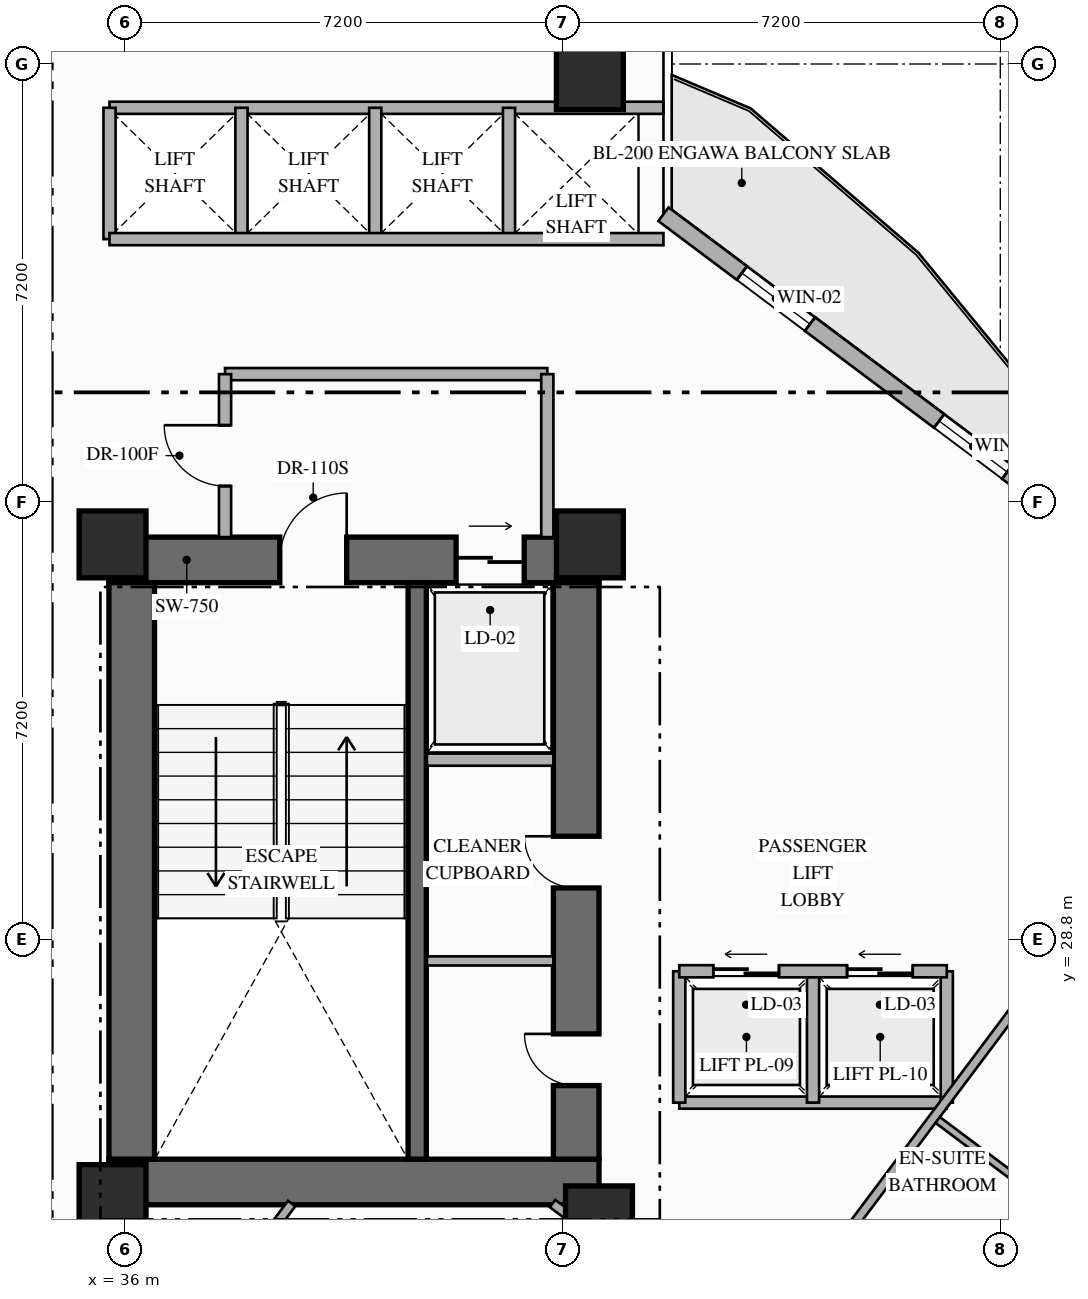
"""IFC4 building model, lengths in metres.
Left out: names, types, materials, properties, quantities, classifications, styles, units other than length and angle.
Written with IfcOpenShell. Run it as: python <this file> out.ifc"""

import sys

from ifc_helpers import new_model, si_unit, direction, frame, frame_2d, origin, origin_2d, place, context, subcontext, project, spatial, rectangle, extrude, element, fill, save


model = new_model("IFC4")
c1 = context("Model", 3, precision=1e-05, world=origin(), true_north=direction((0.0, 1.0)))
c2 = subcontext(c1, "Body", "Model", "MODEL_VIEW")
j1 = project(units=[si_unit("LENGTHUNIT", "METRE"), si_unit("PLANEANGLEUNIT", "RADIAN")], contexts=[c1])
p1 = place(None, origin())
s1 = spatial("IfcSite", under=j1, at=p1, CompositionType="ELEMENT")
p2 = place(p1, origin())
s2 = spatial("IfcBuilding", under=s1, at=p2, CompositionType="ELEMENT")
p3 = place(p2, frame((0.0, 0.0, 56.7)))
s3 = spatial("IfcBuildingStorey", under=s2, at=p3, CompositionType="ELEMENT", Elevation=56.7)
p4 = place(p3, frame((35.74, 24.815, 0.0), z_axis=(0.0, 0.0, 1.0), x_axis=(1.0, 0.0, 0.0)))
e1 = element("IfcWall", 1, at=p4, inside=s3, PredefinedType="SHEAR", context=c2, shape_type="SweptSolid", body=[
    extrude(rectangle(XDim=8.06, YDim=0.75, at=frame_2d((4.03, 0.0))), origin(), (0.0, 0.0, 1.0), 3.35),
])
p5 = place(p3, frame((35.74, 35.045, 0.0), z_axis=(0.0, 0.0, 1.0), x_axis=(1.0, 0.0, 0.0)))
e2 = element("IfcWall", 2, at=p5, inside=s3, PredefinedType="SHEAR", context=c2, shape_type="SweptSolid", body=[
    extrude(rectangle(XDim=8.06, YDim=0.75, at=frame_2d((4.03, 0.0))), origin(), (0.0, 0.0, 1.0), 3.35),
])
p6 = place(p5, frame((2.81, 0.0, 0.0)))
e3 = element("IfcOpeningElement", 3, at=p6, cuts=e2, PredefinedType="OPENING", context=c2, shape_type="SweptSolid", body=[
    extrude(rectangle(XDim=1.1, YDim=2.2, at=frame_2d((0.55, 1.1))), frame((0.0, 0.385, 0.0), z_axis=(0.0, -1.0, 0.0), x_axis=(1.0, 0.0, 0.0)), (0.0, 0.0, 1.0), 0.77),
])
p7 = place(p5, frame((5.71, 0.0, 0.0)))
e4 = element("IfcOpeningElement", 4, at=p7, cuts=e2, PredefinedType="OPENING", context=c2, shape_type="SweptSolid", body=[
    extrude(rectangle(XDim=1.12, YDim=2.15, at=frame_2d((0.56, 1.075))), frame((0.0, 0.385, 0.0), z_axis=(0.0, -1.0, 0.0), x_axis=(1.0, 0.0, 0.0)), (0.0, 0.0, 1.0), 0.77),
])
p8 = place(p3, frame((36.115, 25.19, 0.0), z_axis=(0.0, 0.0, 1.0), x_axis=(0.0, 1.0, 0.0)))
e5 = element("IfcWall", 5, at=p8, inside=s3, PredefinedType="SHEAR", context=c2, shape_type="SweptSolid", body=[
    extrude(rectangle(XDim=9.48, YDim=0.75, at=frame_2d((4.74, 0.0))), origin(), (0.0, 0.0, 1.0), 3.35),
])
p9 = place(p3, frame((43.425, 25.19, 0.0), z_axis=(0.0, 0.0, 1.0), x_axis=(0.0, 1.0, 0.0)))
e6 = element("IfcWall", 6, at=p9, inside=s3, PredefinedType="SHEAR", context=c2, shape_type="SweptSolid", body=[
    extrude(rectangle(XDim=9.48, YDim=0.75, at=frame_2d((4.74, 0.0))), origin(), (0.0, 0.0, 1.0), 3.35),
])
p10 = place(p9, frame((1.21, 0.0, 0.0)))
e7 = element("IfcOpeningElement", 7, at=p10, cuts=e6, PredefinedType="OPENING", context=c2, shape_type="SweptSolid", body=[
    extrude(rectangle(XDim=0.85, YDim=2.08, at=frame_2d((0.425, 1.04))), frame((0.0, 0.385, 0.0), z_axis=(0.0, -1.0, 0.0), x_axis=(1.0, 0.0, 0.0)), (0.0, 0.0, 1.0), 0.77),
])
p11 = place(p9, frame((4.46, 0.0, 0.0)))
e8 = element("IfcOpeningElement", 8, at=p11, cuts=e6, PredefinedType="OPENING", context=c2, shape_type="SweptSolid", body=[
    extrude(rectangle(XDim=0.85, YDim=2.08, at=frame_2d((0.425, 1.04))), frame((0.0, 0.385, 0.0), z_axis=(0.0, -1.0, 0.0), x_axis=(1.0, 0.0, 0.0)), (0.0, 0.0, 1.0), 0.77),
])
p12 = place(p3, frame((40.81, 25.19, 0.0), z_axis=(0.0, 0.0, 1.0), x_axis=(0.0, 1.0, 0.0)))
e9 = element("IfcWall", 9, at=p12, inside=s3, PredefinedType="SHEAR", context=c2, shape_type="SweptSolid", body=[
    extrude(rectangle(XDim=9.48, YDim=0.3, at=frame_2d((4.74, 0.0))), origin(), (0.0, 0.0, 1.0), 3.35),
])
for number, where, z_axis, x_axis in (
    (10, (35.8, 24.55, 0.0), (0.0, 0.0, 1.0), (1.0, 0.0, 0.0)),
    (11, (43.8, 24.2, 0.0), (0.0, 0.0, 1.0), (1.0, 0.0, 0.0)),
    (12, (35.8, 35.3, 0.0), (0.0, 0.0, 1.0), (1.0, 0.0, 0.0)),
    (13, (43.65, 35.3, 0.0), (0.0, 0.0, 1.0), (1.0, 0.0, 0.0)),
    (14, (43.65, 43.0, 0.0), (0.0, 0.0, 1.0), (1.0, 0.0, 0.0)),
):
    element("IfcColumn", number, at=place(p3, frame(where, z_axis=z_axis, x_axis=x_axis)), inside=s3, PredefinedType="COLUMN", context=c2, shape_type="SweptSolid", body=[
        extrude(rectangle(XDim=1.1, YDim=1.1, at=origin_2d()), origin(), (0.0, 0.0, 1.0), 3.35),
    ])
p13 = place(p3, frame((44.86, 40.73, 0.0), z_axis=(0.0, 0.0, 1.0), x_axis=(0.800006902154, -0.599990797017, 0.0)))
e15 = element("IfcWall", 15, at=p13, inside=s3, PredefinedType="STANDARD", context=c2, shape_type="SweptSolid", body=[
    extrude(rectangle(XDim=29.712, YDim=0.28, at=frame_2d((14.856, 0.0))), origin(), (0.0, 0.0, 1.0), 3.13),
])
p14 = place(p13, frame((14.249, 0.0, 0.0)))
e16 = element("IfcOpeningElement", 16, at=p14, cuts=e15, PredefinedType="OPENING", context=c2, shape_type="SweptSolid", body=[
    extrude(rectangle(XDim=1.1, YDim=2.2, at=frame_2d((0.55, 1.1))), frame((0.0, 0.15, 0.0), z_axis=(0.0, -1.0, 0.0), x_axis=(1.0, 0.0, 0.0)), (0.0, 0.0, 1.0), 0.3),
])
p15 = place(p13, frame((1.612, 0.0, 0.85)))
e17 = element("IfcOpeningElement", 17, at=p15, cuts=e15, PredefinedType="OPENING", context=c2, shape_type="SweptSolid", body=[
    extrude(rectangle(XDim=1.4, YDim=1.8, at=frame_2d((0.7, 0.9))), frame((0.0, 0.15, 0.0), z_axis=(0.0, -1.0, 0.0), x_axis=(1.0, 0.0, 0.0)), (0.0, 0.0, 1.0), 0.3),
])
p16 = place(p13, frame((5.667, 0.0, 0.85)))
e18 = element("IfcOpeningElement", 18, at=p16, cuts=e15, PredefinedType="OPENING", context=c2, shape_type="SweptSolid", body=[
    extrude(rectangle(XDim=1.4, YDim=1.8, at=frame_2d((0.7, 0.9))), frame((0.0, 0.15, 0.0), z_axis=(0.0, -1.0, 0.0), x_axis=(1.0, 0.0, 0.0)), (0.0, 0.0, 1.0), 0.3),
])
p17 = place(p13, frame((9.912, 0.0, 0.85)))
e19 = element("IfcOpeningElement", 19, at=p17, cuts=e15, PredefinedType="OPENING", context=c2, shape_type="SweptSolid", body=[
    extrude(rectangle(XDim=1.4, YDim=1.8, at=frame_2d((0.7, 0.9))), frame((0.0, 0.15, 0.0), z_axis=(0.0, -1.0, 0.0), x_axis=(1.0, 0.0, 0.0)), (0.0, 0.0, 1.0), 0.3),
])
p18 = place(p13, frame((19.528, 0.0, 0.85)))
e20 = element("IfcOpeningElement", 20, at=p18, cuts=e15, PredefinedType="OPENING", context=c2, shape_type="SweptSolid", body=[
    extrude(rectangle(XDim=1.4, YDim=1.8, at=frame_2d((0.7, 0.9))), frame((0.0, 0.15, 0.0), z_axis=(0.0, -1.0, 0.0), x_axis=(1.0, 0.0, 0.0)), (0.0, 0.0, 1.0), 0.3),
])
p19 = place(p13, frame((23.451, 0.0, 0.85)))
e21 = element("IfcOpeningElement", 21, at=p19, cuts=e15, PredefinedType="OPENING", context=c2, shape_type="SweptSolid", body=[
    extrude(rectangle(XDim=1.4, YDim=1.8, at=frame_2d((0.7, 0.9))), frame((0.0, 0.15, 0.0), z_axis=(0.0, -1.0, 0.0), x_axis=(1.0, 0.0, 0.0)), (0.0, 0.0, 1.0), 0.3),
])
p20 = place(p13, frame((27.852, 0.0, 0.85)))
e22 = element("IfcOpeningElement", 22, at=p20, cuts=e15, PredefinedType="OPENING", context=c2, shape_type="SweptSolid", body=[
    extrude(rectangle(XDim=1.4, YDim=1.8, at=frame_2d((0.7, 0.9))), frame((0.0, 0.15, 0.0), z_axis=(0.0, -1.0, 0.0), x_axis=(1.0, 0.0, 0.0)), (0.0, 0.0, 1.0), 0.3),
])
p21 = place(p3, frame((40.97, 31.76, 0.0), z_axis=(0.0, 0.0, 1.0), x_axis=(1.0, 0.0, 0.0)))
e23 = element("IfcWall", 23, at=p21, inside=s3, PredefinedType="STANDARD", context=c2, shape_type="SweptSolid", body=[
    extrude(rectangle(XDim=2.08, YDim=0.2, at=frame_2d((1.04, 0.0))), origin(), (0.0, 0.0, 1.0), 3.13),
])
p22 = place(p3, frame((40.97, 28.45, 0.0), z_axis=(0.0, 0.0, 1.0), x_axis=(1.0, 0.0, 0.0)))
e24 = element("IfcWall", 24, at=p22, inside=s3, PredefinedType="PARTITIONING", context=c2, shape_type="SweptSolid", body=[
    extrude(rectangle(XDim=2.08, YDim=0.15, at=frame_2d((1.04, 0.0))), origin(), (0.0, 0.0, 1.0), 3.13),
])
p23 = place(p3, frame((37.65, 38.1, 0.0), z_axis=(0.0, 0.0, 1.0), x_axis=(1.0, 0.0, 0.0)))
e25 = element("IfcWall", 25, at=p23, inside=s3, PredefinedType="STANDARD", context=c2, shape_type="SweptSolid", body=[
    extrude(rectangle(XDim=5.3, YDim=0.2, at=frame_2d((2.65, 0.0))), origin(), (0.0, 0.0, 1.0), 3.13),
])
p24 = place(p3, frame((42.95, 35.42, 0.0), z_axis=(0.0, 0.0, 1.0), x_axis=(0.0, 1.0, 0.0)))
e26 = element("IfcWall", 26, at=p24, inside=s3, PredefinedType="STANDARD", context=c2, shape_type="SweptSolid", body=[
    extrude(rectangle(XDim=2.68, YDim=0.2, at=frame_2d((1.34, 0.0))), origin(), (0.0, 0.0, 1.0), 3.13),
])
p25 = place(p3, frame((37.65, 35.42, 0.0), z_axis=(0.0, 0.0, 1.0), x_axis=(0.0, 1.0, 0.0)))
e27 = element("IfcWall", 27, at=p25, inside=s3, PredefinedType="STANDARD", context=c2, shape_type="SweptSolid", body=[
    extrude(rectangle(XDim=2.68, YDim=0.2, at=frame_2d((1.34, 0.0))), origin(), (0.0, 0.0, 1.0), 3.13),
])
p26 = place(p25, frame((0.84, 0.0, 0.0)))
e28 = element("IfcOpeningElement", 28, at=p26, cuts=e27, PredefinedType="OPENING", context=c2, shape_type="SweptSolid", body=[
    extrude(rectangle(XDim=1.0, YDim=2.2, at=frame_2d((0.5, 1.1))), frame((0.0, 0.11, 0.0), z_axis=(0.0, -1.0, 0.0), x_axis=(1.0, 0.0, 0.0)), (0.0, 0.0, 1.0), 0.22),
])
p27 = place(p3, frame((35.75, 42.48, 0.0), z_axis=(0.0, 0.0, 1.0), x_axis=(1.0, 0.0, 0.0)))
e29 = element("IfcWall", 29, at=p27, inside=s3, PredefinedType="STANDARD", context=c2, shape_type="SweptSolid", body=[
    extrude(rectangle(XDim=9.11, YDim=0.2, at=frame_2d((4.555, 0.0))), origin(), (0.0, 0.0, 1.0), 3.13),
])
for number, where, z_axis, x_axis in (
    (30, (35.75, 40.32, 0.0), (0.0, 0.0, 1.0), (0.0, 1.0, 0.0)),
    (31, (37.92, 40.32, 0.0), (0.0, 0.0, 1.0), (0.0, 1.0, 0.0)),
    (32, (40.12, 40.32, 0.0), (0.0, 0.0, 1.0), (0.0, 1.0, 0.0)),
    (33, (42.32, 40.32, 0.0), (0.0, 0.0, 1.0), (0.0, 1.0, 0.0)),
):
    element("IfcWall", number, at=place(p3, frame(where, z_axis=z_axis, x_axis=x_axis)), inside=s3, PredefinedType="STANDARD", context=c2, shape_type="SweptSolid", body=[
        extrude(rectangle(XDim=2.16, YDim=0.2, at=frame_2d((1.08, 0.0))), origin(), (0.0, 0.0, 1.0), 3.13),
    ])
p28 = place(p3, frame((35.75, 40.32, 0.0), z_axis=(0.0, 0.0, 1.0), x_axis=(1.0, 0.0, 0.0)))
e34 = element("IfcWall", 34, at=p28, inside=s3, PredefinedType="STANDARD", context=c2, shape_type="SweptSolid", body=[
    extrude(rectangle(XDim=9.11, YDim=0.2, at=frame_2d((4.555, 0.0))), origin(), (0.0, 0.0, 1.0), 3.13),
])
p29 = place(p3, frame((45.12, 26.12, 0.0), z_axis=(0.0, 0.0, 1.0), x_axis=(1.0, 0.0, 0.0)))
e35 = element("IfcWall", 35, at=p29, inside=s3, PredefinedType="STANDARD", context=c2, shape_type="SweptSolid", body=[
    extrude(rectangle(XDim=4.4, YDim=0.2, at=frame_2d((2.2, 0.0))), origin(), (0.0, 0.0, 1.0), 3.13),
])
for number, where, z_axis, x_axis in (
    (36, (45.12, 26.12, 0.0), (0.0, 0.0, 1.0), (0.0, 1.0, 0.0)),
    (37, (49.52, 26.12, 0.0), (0.0, 0.0, 1.0), (0.0, 1.0, 0.0)),
    (38, (47.32, 26.12, 0.0), (0.0, 0.0, 1.0), (0.0, 1.0, 0.0)),
):
    element("IfcWall", number, at=place(p3, frame(where, z_axis=z_axis, x_axis=x_axis)), inside=s3, PredefinedType="STANDARD", context=c2, shape_type="SweptSolid", body=[
        extrude(rectangle(XDim=2.16, YDim=0.2, at=frame_2d((1.08, 0.0))), origin(), (0.0, 0.0, 1.0), 3.13),
    ])
p30 = place(p3, frame((45.12, 28.28, 0.0), z_axis=(0.0, 0.0, 1.0), x_axis=(1.0, 0.0, 0.0)))
e39 = element("IfcWall", 39, at=p30, inside=s3, PredefinedType="STANDARD", context=c2, shape_type="SweptSolid", body=[
    extrude(rectangle(XDim=4.4, YDim=0.2, at=frame_2d((2.2, 0.0))), origin(), (0.0, 0.0, 1.0), 3.13),
])
p31 = place(p30, frame((0.56, 0.0, 0.0)))
e40 = element("IfcOpeningElement", 40, at=p31, cuts=e39, PredefinedType="OPENING", context=c2, shape_type="SweptSolid", body=[
    extrude(rectangle(XDim=1.08, YDim=2.15, at=frame_2d((0.54, 1.075))), frame((0.0, 0.11, 0.0), z_axis=(0.0, -1.0, 0.0), x_axis=(1.0, 0.0, 0.0)), (0.0, 0.0, 1.0), 0.22),
])
p32 = place(p30, frame((2.76, 0.0, 0.0)))
e41 = element("IfcOpeningElement", 41, at=p32, cuts=e39, PredefinedType="OPENING", context=c2, shape_type="SweptSolid", body=[
    extrude(rectangle(XDim=1.08, YDim=2.15, at=frame_2d((0.54, 1.075))), frame((0.0, 0.11, 0.0), z_axis=(0.0, -1.0, 0.0), x_axis=(1.0, 0.0, 0.0)), (0.0, 0.0, 1.0), 0.22),
])
p33 = place(p3, frame((43.037, 24.46, 0.0), z_axis=(0.0, 0.0, 1.0), x_axis=(0.799971872363, -0.600037501685, 0.0)))
e42 = element("IfcWall", 42, at=p33, inside=s3, PredefinedType="PARTITIONING", context=c2, shape_type="SweptSolid", body=[
    extrude(rectangle(XDim=4.167, YDim=0.15, at=frame_2d((2.083, 0.0))), origin(), (0.0, 0.0, 1.0), 2.425),
])
p34 = place(p33, frame((2.468, 0.0, 0.0)))
e43 = element("IfcOpeningElement", 43, at=p34, cuts=e42, PredefinedType="OPENING", context=c2, shape_type="SweptSolid", body=[
    extrude(rectangle(XDim=0.95, YDim=2.15, at=frame_2d((0.475, 1.075))), frame((0.0, 0.085, 0.0), z_axis=(0.0, -1.0, 0.0), x_axis=(1.0, 0.0, 0.0)), (0.0, 0.0, 1.0), 0.17),
])
p35 = place(p3, frame((33.384, 17.312, 0.0), z_axis=(0.0, 0.0, 1.0), x_axis=(0.600008743659, 0.799993442181, 0.0)))
e44 = element("IfcWall", 44, at=p35, inside=s3, PredefinedType="PARTITIONING", context=c2, shape_type="SweptSolid", body=[
    extrude(rectangle(XDim=8.935, YDim=0.15, at=frame_2d((4.468, 0.0))), origin(), (0.0, 0.0, 1.0), 3.13),
])
p36 = place(p3, frame((49.59, 22.67, 0.0), z_axis=(0.0, 0.0, 1.0), x_axis=(0.599951172744, 0.800036618114, 0.0)))
e45 = element("IfcWall", 45, at=p36, inside=s3, PredefinedType="PARTITIONING", context=c2, shape_type="SweptSolid", body=[
    extrude(rectangle(XDim=2.4, YDim=0.12, at=frame_2d((1.2, 0.0))), origin(), (0.0, 0.0, 1.0), 3.13),
])
p37 = place(p36, frame((0.8, 0.0, 0.0)))
e46 = element("IfcOpeningElement", 46, at=p37, cuts=e45, PredefinedType="OPENING", context=c2, shape_type="SweptSolid", body=[
    extrude(rectangle(XDim=0.8, YDim=2.06, at=frame_2d((0.4, 1.03))), frame((0.0, 0.07, 0.0), z_axis=(0.0, -1.0, 0.0), x_axis=(1.0, 0.0, 0.0)), (0.0, 0.0, 1.0), 0.14),
])
p38 = place(p3, frame((49.31, 25.88, 0.0), z_axis=(0.0, 0.0, 1.0), x_axis=(0.800040880289, -0.59994548908, 0.0)))
e47 = element("IfcWall", 47, at=p38, inside=s3, PredefinedType="PARTITIONING", context=c2, shape_type="SweptSolid", body=[
    extrude(rectangle(XDim=2.15, YDim=0.12, at=frame_2d((1.075, 0.0))), origin(), (0.0, 0.0, 1.0), 3.13),
])
p39 = place(p3, frame((47.87, 23.96, 0.0), z_axis=(0.0, 0.0, 1.0), x_axis=(0.599996617946, 0.80000253653, 0.0)))
e48 = element("IfcWall", 48, at=p39, inside=s3, PredefinedType="PARTITIONING", context=c2, shape_type="SweptSolid", body=[
    extrude(rectangle(XDim=11.55, YDim=0.15, at=frame_2d((5.775, 0.0))), origin(), (0.0, 0.0, 1.0), 3.13),
])
p40 = place(p15, origin())
e49 = element("IfcWindow", 49, at=p40, inside=s3, PartitioningType="SINGLE_PANEL", PredefinedType="WINDOW", context=c2, shape_type="SweptSolid", body=[
    extrude(rectangle(XDim=1.4, YDim=1.8, at=frame_2d((0.7, 0.9))), frame((0.0, 0.03, 0.0), z_axis=(0.0, -1.0, 0.0), x_axis=(1.0, 0.0, 0.0)), (0.0, 0.0, 1.0), 0.06),
])
fill(e17, e49)
p41 = place(p16, origin())
e50 = element("IfcWindow", 50, at=p41, inside=s3, PartitioningType="SINGLE_PANEL", PredefinedType="WINDOW", context=c2, shape_type="SweptSolid", body=[
    extrude(rectangle(XDim=1.4, YDim=1.8, at=frame_2d((0.7, 0.9))), frame((0.0, 0.03, 0.0), z_axis=(0.0, -1.0, 0.0), x_axis=(1.0, 0.0, 0.0)), (0.0, 0.0, 1.0), 0.06),
])
fill(e18, e50)
p42 = place(p6, origin())
e51 = element("IfcDoor", 51, at=p42, inside=s3, OperationType="SINGLE_SWING_RIGHT", PredefinedType="DOOR", context=c2, shape_type="SweptSolid", body=[
    extrude(rectangle(XDim=1.1, YDim=2.2, at=frame_2d((0.55, 1.1))), frame((0.0, 0.025, 0.0), z_axis=(0.0, -1.0, 0.0), x_axis=(1.0, 0.0, 0.0)), (0.0, 0.0, 1.0), 0.05),
])
fill(e3, e51)
p43 = place(p7, origin())
e52 = element("IfcDoor", 52, at=p43, inside=s3, OperationType="SLIDING_TO_RIGHT", PredefinedType="USERDEFINED", context=c2, shape_type="SweptSolid", body=[
    extrude(rectangle(XDim=1.12, YDim=2.15, at=frame_2d((0.56, 1.075))), frame((0.0, 0.025, 0.0), z_axis=(0.0, -1.0, 0.0), x_axis=(1.0, 0.0, 0.0)), (0.0, 0.0, 1.0), 0.05),
])
fill(e4, e52)
p44 = place(p10, origin())
e53 = element("IfcDoor", 53, at=p44, inside=s3, OperationType="SINGLE_SWING_RIGHT", PredefinedType="DOOR", context=c2, shape_type="SweptSolid", body=[
    extrude(rectangle(XDim=0.85, YDim=2.08, at=frame_2d((0.425, 1.04))), frame((0.0, 0.025, 0.0), z_axis=(0.0, -1.0, 0.0), x_axis=(1.0, 0.0, 0.0)), (0.0, 0.0, 1.0), 0.05),
])
fill(e7, e53)
p45 = place(p11, origin())
e54 = element("IfcDoor", 54, at=p45, inside=s3, OperationType="SINGLE_SWING_RIGHT", PredefinedType="DOOR", context=c2, shape_type="SweptSolid", body=[
    extrude(rectangle(XDim=0.85, YDim=2.08, at=frame_2d((0.425, 1.04))), frame((0.0, 0.025, 0.0), z_axis=(0.0, -1.0, 0.0), x_axis=(1.0, 0.0, 0.0)), (0.0, 0.0, 1.0), 0.05),
])
fill(e8, e54)
p46 = place(p26, origin())
e55 = element("IfcDoor", 55, at=p46, inside=s3, OperationType="SINGLE_SWING_RIGHT", PredefinedType="DOOR", context=c2, shape_type="SweptSolid", body=[
    extrude(rectangle(XDim=1.0, YDim=2.2, at=frame_2d((0.5, 1.1))), frame((0.0, 0.025, 0.0), z_axis=(0.0, -1.0, 0.0), x_axis=(1.0, 0.0, 0.0)), (0.0, 0.0, 1.0), 0.05),
])
fill(e28, e55)
p47 = place(p31, origin())
e56 = element("IfcDoor", 56, at=p47, inside=s3, OperationType="SLIDING_TO_LEFT", PredefinedType="USERDEFINED", context=c2, shape_type="SweptSolid", body=[
    extrude(rectangle(XDim=1.08, YDim=2.15, at=frame_2d((0.54, 1.075))), frame((0.0, 0.025, 0.0), z_axis=(0.0, -1.0, 0.0), x_axis=(1.0, 0.0, 0.0)), (0.0, 0.0, 1.0), 0.05),
])
fill(e40, e56)
p48 = place(p32, origin())
e57 = element("IfcDoor", 57, at=p48, inside=s3, OperationType="SLIDING_TO_LEFT", PredefinedType="USERDEFINED", context=c2, shape_type="SweptSolid", body=[
    extrude(rectangle(XDim=1.08, YDim=2.15, at=frame_2d((0.54, 1.075))), frame((0.0, 0.025, 0.0), z_axis=(0.0, -1.0, 0.0), x_axis=(1.0, 0.0, 0.0)), (0.0, 0.0, 1.0), 0.05),
])
fill(e41, e57)
save(model, sys.argv[1])
